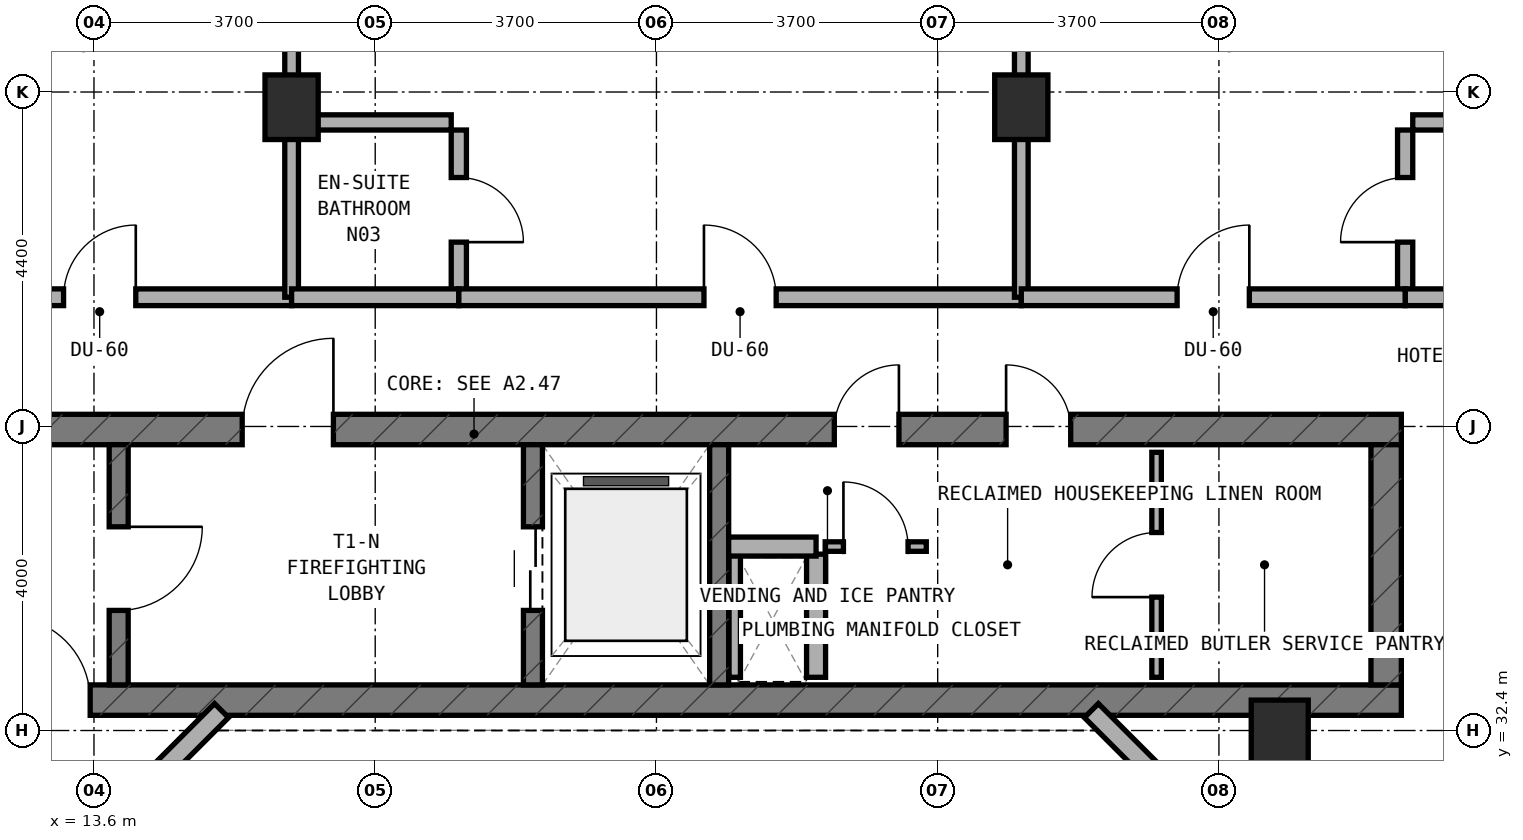
"""IFC4 building model, lengths in metres.
Left out: names, types, materials, properties, quantities, classifications, styles, units other than length and angle.
Written with IfcOpenShell. Run it as: python <this file> out.ifc"""

import sys

from ifc_helpers import new_model, si_unit, direction, frame, frame_2d, origin, origin_2d, place, context, subcontext, project, spatial, rectangle, extrude, element, fill, save


model = new_model("IFC4")
c1 = context("Model", 3, precision=1e-05, world=origin(), true_north=direction((0.0, 1.0)))
c2 = subcontext(c1, "Body", "Model", "MODEL_VIEW")
j1 = project(units=[si_unit("LENGTHUNIT", "METRE"), si_unit("PLANEANGLEUNIT", "RADIAN")], contexts=[c1])
p1 = place(None, origin())
s1 = spatial("IfcSite", under=j1, at=p1, CompositionType="ELEMENT")
p2 = place(p1, origin())
s2 = spatial("IfcBuilding", under=s1, at=p2, CompositionType="ELEMENT")
p3 = place(p2, frame((0.0, 0.0, 220.7)))
s3 = spatial("IfcBuildingStorey", under=s2, at=p3, CompositionType="ELEMENT", Elevation=220.7)
p4 = place(p3, frame((6.4, 32.8, 0.0), z_axis=(0.0, 0.0, 1.0), x_axis=(1.0, 0.0, 0.0)))
e1 = element("IfcWall", 1, at=p4, inside=s3, PredefinedType="SHEAR", context=c2, shape_type="SweptSolid", body=[
    extrude(rectangle(XDim=24.4, YDim=0.4, at=frame_2d((12.2, 0.0))), origin(), (0.0, 0.0, 1.0), 3.6),
])
p5 = place(p4, frame((6.05, 0.0, 0.0)))
e2 = element("IfcOpeningElement", 2, at=p5, cuts=e1, PredefinedType="OPENING", context=c2, shape_type="SweptSolid", body=[
    extrude(rectangle(XDim=1.1, YDim=2.15, at=frame_2d((0.55, 1.075))), frame((0.0, 0.21, 0.0), z_axis=(0.0, -1.0, 0.0), x_axis=(1.0, 0.0, 0.0)), (0.0, 0.0, 1.0), 0.42),
])
p6 = place(p3, frame((6.4, 36.36, 0.0), z_axis=(0.0, 0.0, 1.0), x_axis=(1.0, 0.0, 0.0)))
e3 = element("IfcWall", 3, at=p6, inside=s3, PredefinedType="SHEAR", context=c2, shape_type="SweptSolid", body=[
    extrude(rectangle(XDim=24.4, YDim=0.4, at=frame_2d((12.2, 0.0))), origin(), (0.0, 0.0, 1.0), 3.6),
])
p7 = place(p6, frame((9.15, 0.0, 0.0)))
e4 = element("IfcOpeningElement", 4, at=p7, cuts=e3, PredefinedType="OPENING", context=c2, shape_type="SweptSolid", body=[
    extrude(rectangle(XDim=1.2, YDim=2.15, at=frame_2d((0.6, 1.075))), frame((0.0, 0.21, 0.0), z_axis=(0.0, -1.0, 0.0), x_axis=(1.0, 0.0, 0.0)), (0.0, 0.0, 1.0), 0.42),
])
p8 = place(p6, frame((19.2, 0.0, 0.0)))
e5 = element("IfcOpeningElement", 5, at=p8, cuts=e3, PredefinedType="OPENING", context=c2, shape_type="SweptSolid", body=[
    extrude(rectangle(XDim=0.85, YDim=2.1, at=frame_2d((0.425, 1.05))), frame((0.0, 0.21, 0.0), z_axis=(0.0, -1.0, 0.0), x_axis=(1.0, 0.0, 0.0)), (0.0, 0.0, 1.0), 0.42),
])
p9 = place(p6, frame((16.94, 0.0, 0.0)))
e6 = element("IfcOpeningElement", 6, at=p9, cuts=e3, PredefinedType="OPENING", context=c2, shape_type="SweptSolid", body=[
    extrude(rectangle(XDim=0.85, YDim=2.1, at=frame_2d((0.425, 1.05))), frame((0.0, 0.21, 0.0), z_axis=(0.0, -1.0, 0.0), x_axis=(1.0, 0.0, 0.0)), (0.0, 0.0, 1.0), 0.42),
])
p10 = place(p3, frame((30.6, 33.0, 0.0), z_axis=(0.0, 0.0, 1.0), x_axis=(0.0, 1.0, 0.0)))
e7 = element("IfcWall", 7, at=p10, inside=s3, PredefinedType="SHEAR", context=c2, shape_type="SweptSolid", body=[
    extrude(rectangle(XDim=3.16, YDim=0.4, at=frame_2d((1.58, 0.0))), origin(), (0.0, 0.0, 1.0), 3.6),
])
p11 = place(p3, frame((13.925, 33.0, 0.0), z_axis=(0.0, 0.0, 1.0), x_axis=(0.0, 1.0, 0.0)))
e8 = element("IfcWall", 8, at=p11, inside=s3, PredefinedType="STANDARD", context=c2, shape_type="SweptSolid", body=[
    extrude(rectangle(XDim=3.16, YDim=0.25, at=frame_2d((1.58, 0.0))), origin(), (0.0, 0.0, 1.0), 3.32),
])
p12 = place(p11, frame((0.98, 0.0, 0.0)))
e9 = element("IfcOpeningElement", 9, at=p12, cuts=e8, PredefinedType="OPENING", context=c2, shape_type="SweptSolid", body=[
    extrude(rectangle(XDim=1.1, YDim=2.15, at=frame_2d((0.55, 1.075))), frame((0.0, 0.135, 0.0), z_axis=(0.0, -1.0, 0.0), x_axis=(1.0, 0.0, 0.0)), (0.0, 0.0, 1.0), 0.27),
])
p13 = place(p3, frame((19.375, 33.0, 0.0), z_axis=(0.0, 0.0, 1.0), x_axis=(0.0, 1.0, 0.0)))
e10 = element("IfcWall", 10, at=p13, inside=s3, PredefinedType="STANDARD", context=c2, shape_type="SweptSolid", body=[
    extrude(rectangle(XDim=3.16, YDim=0.25, at=frame_2d((1.58, 0.0))), origin(), (0.0, 0.0, 1.0), 3.32),
])
p14 = place(p13, frame((0.98, 0.0, 0.0)))
e11 = element("IfcOpeningElement", 11, at=p14, cuts=e10, PredefinedType="OPENING", context=c2, shape_type="SweptSolid", body=[
    extrude(rectangle(XDim=1.1, YDim=2.15, at=frame_2d((0.55, 1.075))), frame((0.0, 0.135, 0.0), z_axis=(0.0, -1.0, 0.0), x_axis=(1.0, 0.0, 0.0)), (0.0, 0.0, 1.0), 0.27),
])
p15 = place(p3, frame((21.825, 33.0, 0.0), z_axis=(0.0, 0.0, 1.0), x_axis=(0.0, 1.0, 0.0)))
e12 = element("IfcWall", 12, at=p15, inside=s3, PredefinedType="STANDARD", context=c2, shape_type="SweptSolid", body=[
    extrude(rectangle(XDim=3.16, YDim=0.25, at=frame_2d((1.58, 0.0))), origin(), (0.0, 0.0, 1.0), 3.32),
])
for number, where, z_axis, x_axis in (
    (13, (16.2, 40.6, 0.0), (0.0, 0.0, 1.0), (1.0, 0.0, 0.0)),
    (14, (25.8, 40.6, 0.0), (0.0, 0.0, 1.0), (1.0, 0.0, 0.0)),
):
    element("IfcColumn", number, at=place(p3, frame(where, z_axis=z_axis, x_axis=x_axis)), inside=s3, PredefinedType="COLUMN", context=c2, shape_type="SweptSolid", body=[
        extrude(rectangle(XDim=0.7, YDim=0.85, at=origin_2d()), origin(), (0.0, 0.0, 1.0), 3.6),
    ])
p16 = place(p3, frame((29.2, 32.35, 0.0), z_axis=(0.0, 0.0, 1.0), x_axis=(1.0, 0.0, 0.0)))
e15 = element("IfcColumn", 15, at=p16, inside=s3, PredefinedType="COLUMN", context=c2, shape_type="SweptSolid", body=[
    extrude(rectangle(XDim=0.75, YDim=0.9, at=origin_2d()), origin(), (0.0, 0.0, 1.0), 3.6),
])
for number, where, z_axis, x_axis in (
    (16, (28.556, 30.828, 0.0), (0.0, 0.0, 1.0), (-0.707, 0.707, 0.0)),
    (17, (15.278, 32.662, 0.0), (0.0, 0.0, 1.0), (-0.707, -0.707, 0.0)),
):
    element("IfcWall", number, at=place(p3, frame(where, z_axis=z_axis, x_axis=x_axis)), inside=s3, PredefinedType="STANDARD", context=c2, shape_type="SweptSolid", body=[
        extrude(rectangle(XDim=2.594, YDim=0.26, at=frame_2d((1.297, 0.0))), origin(), (0.0, 0.0, 1.0), 3.32),
    ])
p17 = place(p3, frame((27.58, 33.1, 0.0), z_axis=(0.0, 0.0, 1.0), x_axis=(0.0, 1.0, 0.0)))
e18 = element("IfcWall", 18, at=p17, inside=s3, PredefinedType="PARTITIONING", context=c2, shape_type="SweptSolid", body=[
    extrude(rectangle(XDim=2.96, YDim=0.125, at=frame_2d((1.48, 0.0))), origin(), (0.0, 0.0, 1.0), 3.32),
])
p18 = place(p17, frame((1.055, 0.0, 0.0)))
e19 = element("IfcOpeningElement", 19, at=p18, cuts=e18, PredefinedType="OPENING", context=c2, shape_type="SweptSolid", body=[
    extrude(rectangle(XDim=0.85, YDim=2.1, at=frame_2d((0.425, 1.05))), frame((0.0, 0.073, 0.0), z_axis=(0.0, -1.0, 0.0), x_axis=(1.0, 0.0, 0.0)), (0.0, 0.0, 1.0), 0.145),
])
p19 = place(p3, frame((22.03, 33.1, 0.0), z_axis=(0.0, 0.0, 1.0), x_axis=(0.0, 1.0, 0.0)))
e20 = element("IfcWall", 20, at=p19, inside=s3, PredefinedType="PARTITIONING", context=c2, shape_type="SweptSolid", body=[
    extrude(rectangle(XDim=1.62, YDim=0.15, at=frame_2d((0.81, 0.0))), origin(), (0.0, 0.0, 1.0), 3.32),
])
p20 = place(p3, frame((23.1, 33.1, 0.0), z_axis=(0.0, 0.0, 1.0), x_axis=(0.0, 1.0, 0.0)))
e21 = element("IfcWall", 21, at=p20, inside=s3, PredefinedType="SOLIDWALL", context=c2, shape_type="SweptSolid", body=[
    extrude(rectangle(XDim=1.62, YDim=0.25, at=frame_2d((0.81, 0.0))), origin(), (0.0, 0.0, 1.0), 3.32),
])
p21 = place(p3, frame((21.95, 34.82, 0.0), z_axis=(0.0, 0.0, 1.0), x_axis=(1.0, 0.0, 0.0)))
e22 = element("IfcWall", 22, at=p21, inside=s3, PredefinedType="SOLIDWALL", context=c2, shape_type="SweptSolid", body=[
    extrude(rectangle(XDim=1.15, YDim=0.25, at=frame_2d((0.575, 0.0))), origin(), (0.0, 0.0, 1.0), 3.32),
])
p22 = place(p3, frame((23.22, 34.82, 0.0), z_axis=(0.0, 0.0, 1.0), x_axis=(1.0, 0.0, 0.0)))
e23 = element("IfcWall", 23, at=p22, inside=s3, PredefinedType="PARTITIONING", context=c2, shape_type="SweptSolid", body=[
    extrude(rectangle(XDim=1.33, YDim=0.125, at=frame_2d((0.665, 0.0))), origin(), (0.0, 0.0, 1.0), 3.32),
])
p23 = place(p22, frame((0.24, 0.0, 0.0)))
e24 = element("IfcOpeningElement", 24, at=p23, cuts=e23, PredefinedType="OPENING", context=c2, shape_type="SweptSolid", body=[
    extrude(rectangle(XDim=0.85, YDim=2.1, at=frame_2d((0.425, 1.05))), frame((0.0, 0.073, 0.0), z_axis=(0.0, -1.0, 0.0), x_axis=(1.0, 0.0, 0.0)), (0.0, 0.0, 1.0), 0.145),
])
p24 = place(p3, frame((11.15, 38.1, 0.0), z_axis=(0.0, 0.0, 1.0), x_axis=(1.0, 0.0, 0.0)))
e25 = element("IfcWall", 25, at=p24, inside=s3, PredefinedType="SOLIDWALL", context=c2, shape_type="SweptSolid", body=[
    extrude(rectangle(XDim=5.05, YDim=0.22, at=frame_2d((2.525, 0.0))), origin(), (0.0, 0.0, 1.0), 2.695),
])
p25 = place(p24, frame((2.05, 0.0, 0.0)))
e26 = element("IfcOpeningElement", 26, at=p25, cuts=e25, PredefinedType="OPENING", context=c2, shape_type="SweptSolid", body=[
    extrude(rectangle(XDim=0.95, YDim=2.1, at=frame_2d((0.475, 1.05))), frame((0.0, 0.12, 0.0), z_axis=(0.0, -1.0, 0.0), x_axis=(1.0, 0.0, 0.0)), (0.0, 0.0, 1.0), 0.24),
])
p26 = place(p3, frame((16.2, 38.1, 0.0), z_axis=(0.0, 0.0, 1.0), x_axis=(0.0, 1.0, 0.0)))
e27 = element("IfcWall", 27, at=p26, inside=s3, PredefinedType="SOLIDWALL", context=c2, shape_type="SweptSolid", body=[
    extrude(rectangle(XDim=6.04, YDim=0.18, at=frame_2d((3.02, 0.0))), origin(), (0.0, 0.0, 1.0), 2.695),
])
p27 = place(p3, frame((18.4, 38.2, 0.0), z_axis=(0.0, 0.0, 1.0), x_axis=(0.0, 1.0, 0.0)))
e28 = element("IfcWall", 28, at=p27, inside=s3, PredefinedType="PLUMBINGWALL", context=c2, shape_type="SweptSolid", body=[
    extrude(rectangle(XDim=2.1, YDim=0.2, at=frame_2d((1.05, 0.0))), origin(), (0.0, 0.0, 1.0), 3.025),
])
p28 = place(p27, frame((0.625, 0.0, 0.0)))
e29 = element("IfcOpeningElement", 29, at=p28, cuts=e28, PredefinedType="OPENING", context=c2, shape_type="SweptSolid", body=[
    extrude(rectangle(XDim=0.85, YDim=2.1, at=frame_2d((0.425, 1.05))), frame((0.0, 0.11, 0.0), z_axis=(0.0, -1.0, 0.0), x_axis=(1.0, 0.0, 0.0)), (0.0, 0.0, 1.0), 0.22),
])
p29 = place(p3, frame((16.3, 40.4, 0.0), z_axis=(0.0, 0.0, 1.0), x_axis=(1.0, 0.0, 0.0)))
e30 = element("IfcWall", 30, at=p29, inside=s3, PredefinedType="PLUMBINGWALL", context=c2, shape_type="SweptSolid", body=[
    extrude(rectangle(XDim=2.0, YDim=0.2, at=frame_2d((1.0, 0.0))), origin(), (0.0, 0.0, 1.0), 3.015),
])
p30 = place(p3, frame((16.2, 38.1, 0.0), z_axis=(0.0, 0.0, 1.0), x_axis=(1.0, 0.0, 0.0)))
e31 = element("IfcWall", 31, at=p30, inside=s3, PredefinedType="SOLIDWALL", context=c2, shape_type="SweptSolid", body=[
    extrude(rectangle(XDim=2.2, YDim=0.22, at=frame_2d((1.1, 0.0))), origin(), (0.0, 0.0, 1.0), 2.695),
])
p31 = place(p3, frame((18.4, 38.1, 0.0), z_axis=(0.0, 0.0, 1.0), x_axis=(1.0, 0.0, 0.0)))
e32 = element("IfcWall", 32, at=p31, inside=s3, PredefinedType="SOLIDWALL", context=c2, shape_type="SweptSolid", body=[
    extrude(rectangle(XDim=7.4, YDim=0.22, at=frame_2d((3.7, 0.0))), origin(), (0.0, 0.0, 1.0), 2.695),
])
p32 = place(p31, frame((3.225, 0.0, 0.0)))
e33 = element("IfcOpeningElement", 33, at=p32, cuts=e32, PredefinedType="OPENING", context=c2, shape_type="SweptSolid", body=[
    extrude(rectangle(XDim=0.95, YDim=2.1, at=frame_2d((0.475, 1.05))), frame((0.0, 0.12, 0.0), z_axis=(0.0, -1.0, 0.0), x_axis=(1.0, 0.0, 0.0)), (0.0, 0.0, 1.0), 0.24),
])
p33 = place(p3, frame((25.8, 38.1, 0.0), z_axis=(0.0, 0.0, 1.0), x_axis=(0.0, 1.0, 0.0)))
e34 = element("IfcWall", 34, at=p33, inside=s3, PredefinedType="SOLIDWALL", context=c2, shape_type="SweptSolid", body=[
    extrude(rectangle(XDim=6.04, YDim=0.18, at=frame_2d((3.02, 0.0))), origin(), (0.0, 0.0, 1.0), 2.695),
])
p34 = place(p3, frame((30.85, 38.2, 0.0), z_axis=(0.0, 0.0, 1.0), x_axis=(0.0, 1.0, 0.0)))
e35 = element("IfcWall", 35, at=p34, inside=s3, PredefinedType="PLUMBINGWALL", context=c2, shape_type="SweptSolid", body=[
    extrude(rectangle(XDim=2.1, YDim=0.2, at=frame_2d((1.05, 0.0))), origin(), (0.0, 0.0, 1.0), 3.015),
])
p35 = place(p34, frame((0.625, 0.0, 0.0)))
e36 = element("IfcOpeningElement", 36, at=p35, cuts=e35, PredefinedType="OPENING", context=c2, shape_type="SweptSolid", body=[
    extrude(rectangle(XDim=0.85, YDim=2.1, at=frame_2d((0.425, 1.05))), frame((0.0, 0.11, 0.0), z_axis=(0.0, -1.0, 0.0), x_axis=(1.0, 0.0, 0.0)), (0.0, 0.0, 1.0), 0.22),
])
p36 = place(p3, frame((30.95, 40.4, 0.0), z_axis=(0.0, 0.0, 1.0), x_axis=(1.0, 0.0, 0.0)))
e37 = element("IfcWall", 37, at=p36, inside=s3, PredefinedType="PLUMBINGWALL", context=c2, shape_type="SweptSolid", body=[
    extrude(rectangle(XDim=2.0, YDim=0.2, at=frame_2d((1.0, 0.0))), origin(), (0.0, 0.0, 1.0), 3.015),
])
p37 = place(p3, frame((30.85, 38.1, 0.0), z_axis=(0.0, 0.0, 1.0), x_axis=(1.0, 0.0, 0.0)))
e38 = element("IfcWall", 38, at=p37, inside=s3, PredefinedType="SOLIDWALL", context=c2, shape_type="SweptSolid", body=[
    extrude(rectangle(XDim=2.2, YDim=0.22, at=frame_2d((1.1, 0.0))), origin(), (0.0, 0.0, 1.0), 3.32),
])
p38 = place(p3, frame((25.8, 38.1, 0.0), z_axis=(0.0, 0.0, 1.0), x_axis=(1.0, 0.0, 0.0)))
e39 = element("IfcWall", 39, at=p38, inside=s3, PredefinedType="SOLIDWALL", context=c2, shape_type="SweptSolid", body=[
    extrude(rectangle(XDim=5.05, YDim=0.22, at=frame_2d((2.525, 0.0))), origin(), (0.0, 0.0, 1.0), 2.695),
])
p39 = place(p38, frame((2.05, 0.0, 0.0)))
e40 = element("IfcOpeningElement", 40, at=p39, cuts=e39, PredefinedType="OPENING", context=c2, shape_type="SweptSolid", body=[
    extrude(rectangle(XDim=0.95, YDim=2.1, at=frame_2d((0.475, 1.05))), frame((0.0, 0.12, 0.0), z_axis=(0.0, -1.0, 0.0), x_axis=(1.0, 0.0, 0.0)), (0.0, 0.0, 1.0), 0.24),
])
p40 = place(p12, frame((1.1, 0.0, 0.0), z_axis=(0.0, 0.0, 1.0), x_axis=(-1.0, 0.0, 0.0)))
e41 = element("IfcDoor", 41, at=p40, inside=s3, OperationType="SINGLE_SWING_LEFT", PredefinedType="DOOR", context=c2, shape_type="SweptSolid", body=[
    extrude(rectangle(XDim=1.1, YDim=2.15, at=frame_2d((0.55, 1.075))), frame((0.0, 0.025, 0.0), z_axis=(0.0, -1.0, 0.0), x_axis=(1.0, 0.0, 0.0)), (0.0, 0.0, 1.0), 0.05),
])
fill(e9, e41)
p41 = place(p7, origin())
e42 = element("IfcDoor", 42, at=p41, inside=s3, OperationType="SINGLE_SWING_RIGHT", PredefinedType="DOOR", context=c2, shape_type="SweptSolid", body=[
    extrude(rectangle(XDim=1.2, YDim=2.15, at=frame_2d((0.6, 1.075))), frame((0.0, 0.025, 0.0), z_axis=(0.0, -1.0, 0.0), x_axis=(1.0, 0.0, 0.0)), (0.0, 0.0, 1.0), 0.05),
])
fill(e4, e42)
p42 = place(p14, origin())
e43 = element("IfcDoor", 43, at=p42, inside=s3, OperationType="DOUBLE_DOOR_SLIDING", PredefinedType="DOOR", context=c2, shape_type="SweptSolid", body=[
    extrude(rectangle(XDim=1.1, YDim=2.15, at=frame_2d((0.55, 1.075))), frame((0.0, 0.025, 0.0), z_axis=(0.0, -1.0, 0.0), x_axis=(1.0, 0.0, 0.0)), (0.0, 0.0, 1.0), 0.05),
])
fill(e11, e43)
p43 = place(p8, origin())
e44 = element("IfcDoor", 44, at=p43, inside=s3, OperationType="SINGLE_SWING_LEFT", PredefinedType="DOOR", context=c2, shape_type="SweptSolid", body=[
    extrude(rectangle(XDim=0.85, YDim=2.1, at=frame_2d((0.425, 1.05))), frame((0.0, 0.025, 0.0), z_axis=(0.0, -1.0, 0.0), x_axis=(1.0, 0.0, 0.0)), (0.0, 0.0, 1.0), 0.05),
])
fill(e5, e44)
p44 = place(p9, origin())
e45 = element("IfcDoor", 45, at=p44, inside=s3, OperationType="SINGLE_SWING_RIGHT", PredefinedType="DOOR", context=c2, shape_type="SweptSolid", body=[
    extrude(rectangle(XDim=0.85, YDim=2.1, at=frame_2d((0.425, 1.05))), frame((0.0, 0.025, 0.0), z_axis=(0.0, -1.0, 0.0), x_axis=(1.0, 0.0, 0.0)), (0.0, 0.0, 1.0), 0.05),
])
fill(e6, e45)
p45 = place(p5, origin())
e46 = element("IfcDoor", 46, at=p45, inside=s3, OperationType="SINGLE_SWING_LEFT", PredefinedType="DOOR", context=c2, shape_type="SweptSolid", body=[
    extrude(rectangle(XDim=1.1, YDim=2.15, at=frame_2d((0.55, 1.075))), frame((0.0, 0.025, 0.0), z_axis=(0.0, -1.0, 0.0), x_axis=(1.0, 0.0, 0.0)), (0.0, 0.0, 1.0), 0.05),
])
fill(e2, e46)
p46 = place(p18, origin())
e47 = element("IfcDoor", 47, at=p46, inside=s3, OperationType="SINGLE_SWING_LEFT", PredefinedType="DOOR", context=c2, shape_type="SweptSolid", body=[
    extrude(rectangle(XDim=0.85, YDim=2.1, at=frame_2d((0.425, 1.05))), frame((0.0, 0.025, 0.0), z_axis=(0.0, -1.0, 0.0), x_axis=(1.0, 0.0, 0.0)), (0.0, 0.0, 1.0), 0.05),
])
fill(e19, e47)
p47 = place(p23, origin())
e48 = element("IfcDoor", 48, at=p47, inside=s3, OperationType="SINGLE_SWING_LEFT", PredefinedType="DOOR", context=c2, shape_type="SweptSolid", body=[
    extrude(rectangle(XDim=0.85, YDim=2.1, at=frame_2d((0.425, 1.05))), frame((0.0, 0.025, 0.0), z_axis=(0.0, -1.0, 0.0), x_axis=(1.0, 0.0, 0.0)), (0.0, 0.0, 1.0), 0.05),
])
fill(e24, e48)
p48 = place(p25, origin())
e49 = element("IfcDoor", 49, at=p48, inside=s3, OperationType="SINGLE_SWING_RIGHT", PredefinedType="DOOR", context=c2, shape_type="SweptSolid", body=[
    extrude(rectangle(XDim=0.95, YDim=2.1, at=frame_2d((0.475, 1.05))), frame((0.0, 0.025, 0.0), z_axis=(0.0, -1.0, 0.0), x_axis=(1.0, 0.0, 0.0)), (0.0, 0.0, 1.0), 0.05),
])
fill(e26, e49)
p49 = place(p28, frame((0.85, 0.0, 0.0), z_axis=(0.0, 0.0, 1.0), x_axis=(-1.0, 0.0, 0.0)))
e50 = element("IfcDoor", 50, at=p49, inside=s3, OperationType="SINGLE_SWING_RIGHT", PredefinedType="DOOR", context=c2, shape_type="SweptSolid", body=[
    extrude(rectangle(XDim=0.85, YDim=2.1, at=frame_2d((0.425, 1.05))), frame((0.0, 0.025, 0.0), z_axis=(0.0, -1.0, 0.0), x_axis=(1.0, 0.0, 0.0)), (0.0, 0.0, 1.0), 0.05),
])
fill(e29, e50)
p50 = place(p32, origin())
e51 = element("IfcDoor", 51, at=p50, inside=s3, OperationType="SINGLE_SWING_LEFT", PredefinedType="DOOR", context=c2, shape_type="SweptSolid", body=[
    extrude(rectangle(XDim=0.95, YDim=2.1, at=frame_2d((0.475, 1.05))), frame((0.0, 0.025, 0.0), z_axis=(0.0, -1.0, 0.0), x_axis=(1.0, 0.0, 0.0)), (0.0, 0.0, 1.0), 0.05),
])
fill(e33, e51)
p51 = place(p35, origin())
e52 = element("IfcDoor", 52, at=p51, inside=s3, OperationType="SINGLE_SWING_LEFT", PredefinedType="DOOR", context=c2, shape_type="SweptSolid", body=[
    extrude(rectangle(XDim=0.85, YDim=2.1, at=frame_2d((0.425, 1.05))), frame((0.0, 0.025, 0.0), z_axis=(0.0, -1.0, 0.0), x_axis=(1.0, 0.0, 0.0)), (0.0, 0.0, 1.0), 0.05),
])
fill(e36, e52)
p52 = place(p39, origin())
e53 = element("IfcDoor", 53, at=p52, inside=s3, OperationType="SINGLE_SWING_RIGHT", PredefinedType="DOOR", context=c2, shape_type="SweptSolid", body=[
    extrude(rectangle(XDim=0.95, YDim=2.1, at=frame_2d((0.475, 1.05))), frame((0.0, 0.025, 0.0), z_axis=(0.0, -1.0, 0.0), x_axis=(1.0, 0.0, 0.0)), (0.0, 0.0, 1.0), 0.05),
])
fill(e40, e53)
save(model, sys.argv[1])
